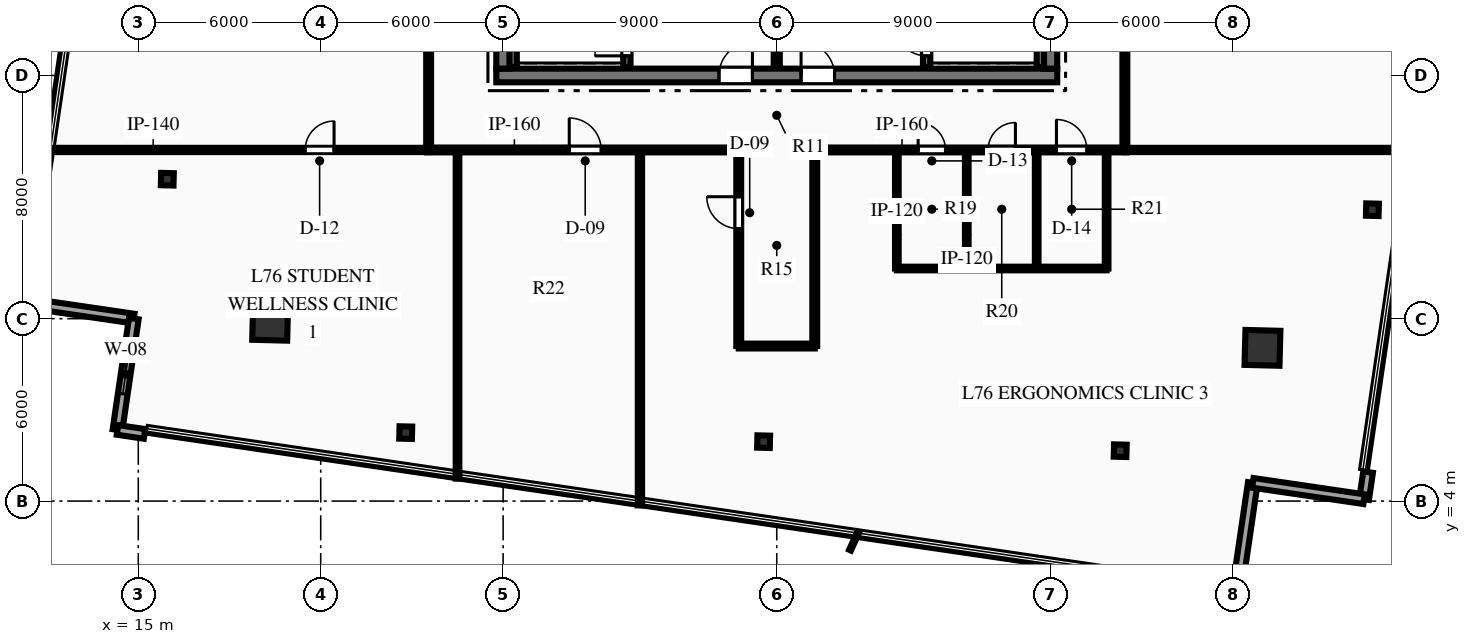
"""IFC4 building model, lengths in metres.
Left out: names, types, materials, properties, quantities, classifications, styles, units other than length and angle.
Written with IfcOpenShell. Run it as: python <this file> out.ifc"""

import sys

from ifc_helpers import new_model, si_unit, direction, frame, frame_2d, origin, origin_2d, place, context, subcontext, project, spatial, rectangle, hollow_rectangle, i_section, extrude, element, fill, save


model = new_model("IFC4")
c1 = context("Model", 3, precision=1e-05, world=origin(), true_north=direction((0.0, 1.0)))
c2 = subcontext(c1, "Body", "Model", "MODEL_VIEW")
j1 = project(units=[si_unit("LENGTHUNIT", "METRE"), si_unit("PLANEANGLEUNIT", "RADIAN")], contexts=[c1])
p1 = place(None, origin())
s1 = spatial("IfcSite", under=j1, at=p1, CompositionType="ELEMENT")
p2 = place(p1, origin())
s2 = spatial("IfcBuilding", under=s1, at=p2, CompositionType="ELEMENT")
p3 = place(p2, frame((0.0, 0.0, 302.7)))
s3 = spatial("IfcBuildingStorey", under=s2, at=p3, CompositionType="ELEMENT", Elevation=302.7)
p4 = place(p3, frame((26.775, 18.0, 0.0), z_axis=(0.0, 0.0, 1.0), x_axis=(1.0, 0.0, 0.0)))
e1 = element("IfcWall", 1, at=p4, inside=s3, PredefinedType="SHEAR", context=c2, shape_type="SweptSolid", body=[
    extrude(rectangle(XDim=18.45, YDim=0.45, at=frame_2d((9.225, 0.0))), origin(), (0.0, 0.0, 1.0), 3.75),
])
p5 = place(p4, frame((7.325, 0.0, 0.0)))
e2 = element("IfcOpeningElement", 2, at=p5, cuts=e1, PredefinedType="OPENING", context=c2, shape_type="SweptSolid", body=[
    extrude(rectangle(XDim=1.1, YDim=2.15, at=frame_2d((0.55, 1.075))), frame((0.0, 0.235, 0.0), z_axis=(0.0, -1.0, 0.0), x_axis=(1.0, 0.0, 0.0)), (0.0, 0.0, 1.0), 0.47),
])
p6 = place(p4, frame((10.025, 0.0, 0.0)))
e3 = element("IfcOpeningElement", 3, at=p6, cuts=e1, PredefinedType="OPENING", context=c2, shape_type="SweptSolid", body=[
    extrude(rectangle(XDim=1.1, YDim=2.15, at=frame_2d((0.55, 1.075))), frame((0.0, 0.235, 0.0), z_axis=(0.0, -1.0, 0.0), x_axis=(1.0, 0.0, 0.0)), (0.0, 0.0, 1.0), 0.47),
])
p7 = place(p3, frame((27.0, 18.225, 0.0), z_axis=(0.0, 0.0, 1.0), x_axis=(0.0, 1.0, 0.0)))
e4 = element("IfcWall", 4, at=p7, inside=s3, PredefinedType="SHEAR", context=c2, shape_type="SweptSolid", body=[
    extrude(rectangle(XDim=15.55, YDim=0.45, at=frame_2d((7.775, 0.0))), origin(), (0.0, 0.0, 1.0), 3.75),
])
p8 = place(p7, frame((10.015, 0.0, 0.0)))
e5 = element("IfcOpeningElement", 5, at=p8, cuts=e4, PredefinedType="OPENING", context=c2, shape_type="SweptSolid", body=[
    extrude(rectangle(XDim=1.4, YDim=2.2, at=frame_2d((0.7, 1.1))), frame((0.0, 0.235, 0.0), z_axis=(0.0, -1.0, 0.0), x_axis=(1.0, 0.0, 0.0)), (0.0, 0.0, 1.0), 0.47),
])
p9 = place(p3, frame((45.0, 18.225, 0.0), z_axis=(0.0, 0.0, 1.0), x_axis=(0.0, 1.0, 0.0)))
e6 = element("IfcWall", 6, at=p9, inside=s3, PredefinedType="SHEAR", context=c2, shape_type="SweptSolid", body=[
    extrude(rectangle(XDim=15.55, YDim=0.45, at=frame_2d((7.775, 0.0))), origin(), (0.0, 0.0, 1.0), 3.75),
])
p10 = place(p9, frame((10.015, 0.0, 0.0)))
e7 = element("IfcOpeningElement", 7, at=p10, cuts=e6, PredefinedType="OPENING", context=c2, shape_type="SweptSolid", body=[
    extrude(rectangle(XDim=1.4, YDim=2.2, at=frame_2d((0.7, 1.1))), frame((0.0, 0.235, 0.0), z_axis=(0.0, -1.0, 0.0), x_axis=(1.0, 0.0, 0.0)), (0.0, 0.0, 1.0), 0.47),
])
p11 = place(p3, frame((31.07, 18.28, 0.0), z_axis=(0.0, 0.0, 1.0), x_axis=(0.0, 1.0, 0.0)))
e8 = element("IfcWall", 8, at=p11, inside=s3, PredefinedType="SHEAR", context=c2, shape_type="SweptSolid", body=[
    extrude(rectangle(XDim=8.26, YDim=0.24, at=frame_2d((4.13, 0.0))), origin(), (0.0, 0.0, 1.0), 3.75),
])
p12 = place(p11, frame((0.365, 0.0, 0.0)))
e9 = element("IfcOpeningElement", 9, at=p12, cuts=e8, PredefinedType="OPENING", context=c2, shape_type="SweptSolid", body=[
    extrude(rectangle(XDim=1.05, YDim=2.15, at=frame_2d((0.525, 1.075))), frame((0.0, 0.13, 0.0), z_axis=(0.0, -1.0, 0.0), x_axis=(1.0, 0.0, 0.0)), (0.0, 0.0, 1.0), 0.26),
])
p13 = place(p3, frame((27.33, 18.28, 0.0), z_axis=(0.0, 0.0, 1.0), x_axis=(0.0, 1.0, 0.0)))
e10 = element("IfcWall", 10, at=p13, inside=s3, PredefinedType="SHEAR", context=c2, shape_type="SweptSolid", body=[
    extrude(rectangle(XDim=8.26, YDim=0.24, at=frame_2d((4.13, 0.0))), origin(), (0.0, 0.0, 1.0), 3.75),
])
p14 = place(p3, frame((40.93, 18.28, 0.0), z_axis=(0.0, 0.0, 1.0), x_axis=(0.0, 1.0, 0.0)))
e11 = element("IfcWall", 11, at=p14, inside=s3, PredefinedType="SHEAR", context=c2, shape_type="SweptSolid", body=[
    extrude(rectangle(XDim=8.26, YDim=0.24, at=frame_2d((4.13, 0.0))), origin(), (0.0, 0.0, 1.0), 3.75),
])
p15 = place(p14, frame((0.365, 0.0, 0.0)))
e12 = element("IfcOpeningElement", 12, at=p15, cuts=e11, PredefinedType="OPENING", context=c2, shape_type="SweptSolid", body=[
    extrude(rectangle(XDim=1.05, YDim=2.15, at=frame_2d((0.525, 1.075))), frame((0.0, 0.13, 0.0), z_axis=(0.0, -1.0, 0.0), x_axis=(1.0, 0.0, 0.0)), (0.0, 0.0, 1.0), 0.26),
])
p16 = place(p3, frame((44.67, 18.28, 0.0), z_axis=(0.0, 0.0, 1.0), x_axis=(0.0, 1.0, 0.0)))
e13 = element("IfcWall", 13, at=p16, inside=s3, PredefinedType="SHEAR", context=c2, shape_type="SweptSolid", body=[
    extrude(rectangle(XDim=8.26, YDim=0.24, at=frame_2d((4.13, 0.0))), origin(), (0.0, 0.0, 1.0), 3.75),
])
for number, where, z_axis, x_axis in (
    (14, (51.976, 9.04, 0.0), (0.0, 0.0, 1.0), (0.025, 1.0, 0.0)),
    (15, (19.336, 9.866, 0.0), (0.0, 0.0, 1.0), (0.025, 1.0, 0.0)),
):
    element("IfcColumn", number, at=place(p3, frame(where, z_axis=z_axis, x_axis=x_axis)), inside=s3, PredefinedType="COLUMN", context=c2, shape_type="SweptSolid", body=[
        extrude(hollow_rectangle(XDim=1.15, YDim=1.15, WallThickness=0.05, at=origin_2d()), origin(), (0.0, 0.0, 1.0), 3.75),
    ])
for number, where, z_axis, x_axis in (
    (16, (55.592, 13.584, 0.0), (0.0, 0.0, 1.0), (0.025, 1.0, 0.0)),
    (17, (15.955, 14.588, 0.0), (0.0, 0.0, 1.0), (0.025, 1.0, 0.0)),
    (18, (23.796, 6.252, 0.0), (0.0, 0.0, 1.0), (0.025, 1.0, 0.0)),
    (19, (35.568, 5.955, 0.0), (0.0, 0.0, 1.0), (0.025, 1.0, 0.0)),
    (20, (47.297, 5.658, 0.0), (0.0, 0.0, 1.0), (0.025, 1.0, 0.0)),
):
    element("IfcColumn", number, at=place(p3, frame(where, z_axis=z_axis, x_axis=x_axis)), inside=s3, PredefinedType="COLUMN", context=c2, shape_type="SweptSolid", body=[
        extrude(i_section(OverallWidth=0.406, OverallDepth=0.416, WebThickness=0.03, FlangeThickness=0.048, at=origin_2d()), origin(), (0.0, 0.0, 1.0), 3.75),
    ])
p17 = place(p3, frame((55.45, 4.952, 0.0), z_axis=(0.0, 0.0, 1.0), x_axis=(-0.145142516059, -0.989410759004, 0.0)))
e21 = element("IfcWall", 21, at=p17, inside=s3, PredefinedType="STANDARD", context=c2, shape_type="SweptSolid", body=[
    extrude(rectangle(XDim=0.9, YDim=0.32, at=frame_2d((0.45, 0.0))), origin(), (0.0, 0.0, 1.0), 3.49),
])
p18 = place(p3, frame((14.853, 10.001, 0.0), z_axis=(0.0, 0.0, 1.0), x_axis=(-0.989398487116, 0.145226146725, 0.0)))
e22 = element("IfcWall", 22, at=p18, inside=s3, PredefinedType="STANDARD", context=c2, shape_type="SweptSolid", body=[
    extrude(rectangle(XDim=3.7, YDim=0.32, at=frame_2d((1.85, 0.0))), origin(), (0.0, 0.0, 1.0), 3.49),
])
p19 = place(p3, frame((14.315, 6.341, 0.0), z_axis=(0.0, 0.0, 1.0), x_axis=(0.145235628047, 0.98939709538, 0.0)))
e23 = element("IfcWall", 23, at=p19, inside=s3, PredefinedType="STANDARD", context=c2, shape_type="SweptSolid", body=[
    extrude(rectangle(XDim=3.7, YDim=0.32, at=frame_2d((1.85, 0.0))), origin(), (0.0, 0.0, 1.0), 3.49),
])
p20 = place(p19, frame((1.2, 0.0, 0.85)))
e24 = element("IfcOpeningElement", 24, at=p20, cuts=e23, PredefinedType="OPENING", context=c2, shape_type="SweptSolid", body=[
    extrude(rectangle(XDim=1.3, YDim=1.9, at=frame_2d((0.65, 0.95))), frame((0.0, 0.17, 0.0), z_axis=(0.0, -1.0, 0.0), x_axis=(1.0, 0.0, 0.0)), (0.0, 0.0, 1.0), 0.34),
])
p21 = place(p3, frame((15.206, 6.21, 0.0), z_axis=(0.0, 0.0, 1.0), x_axis=(-0.989377499091, 0.145369062366, 0.0)))
e25 = element("IfcWall", 25, at=p21, inside=s3, PredefinedType="STANDARD", context=c2, shape_type="SweptSolid", body=[
    extrude(rectangle(XDim=0.9, YDim=0.32, at=frame_2d((0.45, 0.0))), origin(), (0.0, 0.0, 1.0), 3.49),
])
for number, where, z_axis, x_axis in (
    (26, (51.658, 4.599, 0.0), (0.0, 0.0, 1.0), (-0.145, -0.989, 0.0)),
    (27, (55.319, 4.062, 0.0), (0.0, 0.0, 1.0), (-0.989, 0.145, 0.0)),
):
    element("IfcWall", number, at=place(p3, frame(where, z_axis=z_axis, x_axis=x_axis)), inside=s3, PredefinedType="STANDARD", context=c2, shape_type="SweptSolid", body=[
        extrude(rectangle(XDim=3.7, YDim=0.32, at=frame_2d((1.85, 0.0))), origin(), (0.0, 0.0, 1.0), 3.49),
    ])
p22 = place(p3, frame((36.0, 18.28, 0.0), z_axis=(0.0, 0.0, 1.0), x_axis=(0.0, 1.0, 0.0)))
e28 = element("IfcWall", 28, at=p22, inside=s3, PredefinedType="PARTITIONING", context=c2, shape_type="SweptSolid", body=[
    extrude(rectangle(XDim=3.77, YDim=0.2, at=frame_2d((1.885, 0.0))), origin(), (0.0, 0.0, 1.0), 3.49),
])
p23 = place(p3, frame((24.5, 15.55, 0.0), z_axis=(0.0, 0.0, 1.0), x_axis=(1.0, 0.0, 0.0)))
e29 = element("IfcWall", 29, at=p23, inside=s3, PredefinedType="PARTITIONING", context=c2, shape_type="SweptSolid", body=[
    extrude(rectangle(XDim=10.25, YDim=0.16, at=frame_2d((5.125, 0.0))), origin(), (0.0, 0.0, 1.0), 3.49),
])
p24 = place(p23, frame((4.675, 0.0, 0.0)))
e30 = element("IfcOpeningElement", 30, at=p24, cuts=e29, PredefinedType="OPENING", context=c2, shape_type="SweptSolid", body=[
    extrude(rectangle(XDim=1.05, YDim=2.15, at=frame_2d((0.525, 1.075))), frame((0.0, 0.09, 0.0), z_axis=(0.0, -1.0, 0.0), x_axis=(1.0, 0.0, 0.0)), (0.0, 0.0, 1.0), 0.18),
])
p25 = place(p3, frame((37.25, 15.55, 0.0), z_axis=(0.0, 0.0, 1.0), x_axis=(1.0, 0.0, 0.0)))
e31 = element("IfcWall", 31, at=p25, inside=s3, PredefinedType="PARTITIONING", context=c2, shape_type="SweptSolid", body=[
    extrude(rectangle(XDim=10.25, YDim=0.16, at=frame_2d((5.125, 0.0))), origin(), (0.0, 0.0, 1.0), 3.49),
])
p26 = place(p25, frame((3.4, 0.0, 0.0)))
e32 = element("IfcOpeningElement", 32, at=p26, cuts=e31, PredefinedType="OPENING", context=c2, shape_type="SweptSolid", body=[
    extrude(rectangle(XDim=0.9, YDim=2.15, at=frame_2d((0.45, 1.075))), frame((0.0, 0.09, 0.0), z_axis=(0.0, -1.0, 0.0), x_axis=(1.0, 0.0, 0.0)), (0.0, 0.0, 1.0), 0.18),
])
p27 = place(p25, frame((5.7, 0.0, 0.0)))
e33 = element("IfcOpeningElement", 33, at=p27, cuts=e31, PredefinedType="OPENING", context=c2, shape_type="SweptSolid", body=[
    extrude(rectangle(XDim=0.9, YDim=2.15, at=frame_2d((0.45, 1.075))), frame((0.0, 0.09, 0.0), z_axis=(0.0, -1.0, 0.0), x_axis=(1.0, 0.0, 0.0)), (0.0, 0.0, 1.0), 0.18),
])
p28 = place(p25, frame((7.95, 0.0, 0.0)))
e34 = element("IfcOpeningElement", 34, at=p28, cuts=e31, PredefinedType="OPENING", context=c2, shape_type="SweptSolid", body=[
    extrude(rectangle(XDim=1.0, YDim=2.15, at=frame_2d((0.5, 1.075))), frame((0.0, 0.09, 0.0), z_axis=(0.0, -1.0, 0.0), x_axis=(1.0, 0.0, 0.0)), (0.0, 0.0, 1.0), 0.18),
])
p29 = place(p3, frame((24.55, 15.55, 0.0), z_axis=(0.0, 0.0, 1.0), x_axis=(0.0, 1.0, 0.0)))
e35 = element("IfcWall", 35, at=p29, inside=s3, PredefinedType="PARTITIONING", context=c2, shape_type="SweptSolid", body=[
    extrude(rectangle(XDim=9.2, YDim=0.16, at=frame_2d((4.6, 0.0))), origin(), (0.0, 0.0, 1.0), 3.49),
])
p30 = place(p29, frame((4.075, 0.0, 0.0)))
e36 = element("IfcOpeningElement", 36, at=p30, cuts=e35, PredefinedType="OPENING", context=c2, shape_type="SweptSolid", body=[
    extrude(rectangle(XDim=1.05, YDim=2.15, at=frame_2d((0.525, 1.075))), frame((0.0, 0.09, 0.0), z_axis=(0.0, -1.0, 0.0), x_axis=(1.0, 0.0, 0.0)), (0.0, 0.0, 1.0), 0.18),
])
p31 = place(p3, frame((47.45, 15.55, 0.0), z_axis=(0.0, 0.0, 1.0), x_axis=(0.0, 1.0, 0.0)))
e37 = element("IfcWall", 37, at=p31, inside=s3, PredefinedType="PARTITIONING", context=c2, shape_type="SweptSolid", body=[
    extrude(rectangle(XDim=9.2, YDim=0.16, at=frame_2d((4.6, 0.0))), origin(), (0.0, 0.0, 1.0), 3.49),
])
p32 = place(p3, frame((34.75, 9.1, 0.0), z_axis=(0.0, 0.0, 1.0), x_axis=(0.0, 1.0, 0.0)))
e38 = element("IfcWall", 38, at=p32, inside=s3, PredefinedType="PARTITIONING", context=c2, shape_type="SweptSolid", body=[
    extrude(rectangle(XDim=6.45, YDim=0.16, at=frame_2d((3.225, 0.0))), origin(), (0.0, 0.0, 1.0), 3.49),
])
p33 = place(p32, frame((3.861, 0.0, 0.0)))
e39 = element("IfcOpeningElement", 39, at=p33, cuts=e38, PredefinedType="OPENING", context=c2, shape_type="SweptSolid", body=[
    extrude(rectangle(XDim=1.05, YDim=2.15, at=frame_2d((0.525, 1.075))), frame((0.0, 0.09, 0.0), z_axis=(0.0, -1.0, 0.0), x_axis=(1.0, 0.0, 0.0)), (0.0, 0.0, 1.0), 0.18),
])
p34 = place(p3, frame((37.25, 9.1, 0.0), z_axis=(0.0, 0.0, 1.0), x_axis=(0.0, 1.0, 0.0)))
e40 = element("IfcWall", 40, at=p34, inside=s3, PredefinedType="PARTITIONING", context=c2, shape_type="SweptSolid", body=[
    extrude(rectangle(XDim=6.45, YDim=0.16, at=frame_2d((3.225, 0.0))), origin(), (0.0, 0.0, 1.0), 3.49),
])
p35 = place(p3, frame((34.75, 9.1, 0.0), z_axis=(0.0, 0.0, 1.0), x_axis=(1.0, 0.0, 0.0)))
e41 = element("IfcWall", 41, at=p35, inside=s3, PredefinedType="PARTITIONING", context=c2, shape_type="SweptSolid", body=[
    extrude(rectangle(XDim=2.5, YDim=0.16, at=frame_2d((1.25, 0.0))), origin(), (0.0, 0.0, 1.0), 3.49),
])
for number, where, z_axis, x_axis in (
    (42, (39.95, 11.65, 0.0), (0.0, 0.0, 1.0), (0.0, 1.0, 0.0)),
    (43, (42.25, 11.65, 0.0), (0.0, 0.0, 1.0), (0.0, 1.0, 0.0)),
    (44, (44.55, 11.65, 0.0), (0.0, 0.0, 1.0), (0.0, 1.0, 0.0)),
    (45, (46.85, 11.65, 0.0), (0.0, 0.0, 1.0), (0.0, 1.0, 0.0)),
):
    element("IfcWall", number, at=place(p3, frame(where, z_axis=z_axis, x_axis=x_axis)), inside=s3, PredefinedType="PARTITIONING", context=c2, shape_type="SweptSolid", body=[
        extrude(rectangle(XDim=3.9, YDim=0.12, at=frame_2d((1.95, 0.0))), origin(), (0.0, 0.0, 1.0), 3.49),
    ])
p36 = place(p3, frame((39.95, 11.65, 0.0), z_axis=(0.0, 0.0, 1.0), x_axis=(1.0, 0.0, 0.0)))
e46 = element("IfcWall", 46, at=p36, inside=s3, PredefinedType="PARTITIONING", context=c2, shape_type="SweptSolid", body=[
    extrude(rectangle(XDim=6.9, YDim=0.12, at=frame_2d((3.45, 0.0))), origin(), (0.0, 0.0, 1.0), 3.49),
])
p37 = place(p3, frame((11.968, 15.55, 0.0), z_axis=(0.0, 0.0, 1.0), x_axis=(1.0, 0.0, 0.0)))
e47 = element("IfcWall", 47, at=p37, inside=s3, PredefinedType="PARTITIONING", context=c2, shape_type="SweptSolid", body=[
    extrude(rectangle(XDim=12.582, YDim=0.14, at=frame_2d((6.291, 0.0))), origin(), (0.0, 0.0, 1.0), 3.079),
])
p38 = place(p37, frame((8.521, 0.0, 0.0)))
e48 = element("IfcOpeningElement", 48, at=p38, cuts=e47, PredefinedType="OPENING", context=c2, shape_type="SweptSolid", body=[
    extrude(rectangle(XDim=0.95, YDim=2.15, at=frame_2d((0.475, 1.075))), frame((0.0, 0.08, 0.0), z_axis=(0.0, -1.0, 0.0), x_axis=(1.0, 0.0, 0.0)), (0.0, 0.0, 1.0), 0.16),
])
p39 = place(p3, frame((47.45, 15.55, 0.0), z_axis=(0.0, 0.0, 1.0), x_axis=(1.0, 0.0, 0.0)))
e49 = element("IfcWall", 49, at=p39, inside=s3, PredefinedType="PARTITIONING", context=c2, shape_type="SweptSolid", body=[
    extrude(rectangle(XDim=9.515, YDim=0.14, at=frame_2d((4.757, 0.0))), origin(), (0.0, 0.0, 1.0), 2.868),
])
p40 = place(p3, frame((25.5, 4.74, 0.0), z_axis=(0.0, 0.0, 1.0), x_axis=(0.0, 1.0, 0.0)))
e50 = element("IfcWall", 50, at=p40, inside=s3, PredefinedType="PARTITIONING", context=c2, shape_type="SweptSolid", body=[
    extrude(rectangle(XDim=10.811, YDim=0.12, at=frame_2d((5.405, 0.0))), origin(), (0.0, 0.0, 1.0), 2.868),
])
p41 = place(p3, frame((31.5, 3.859, 0.0), z_axis=(0.0, 0.0, 1.0), x_axis=(0.0, 1.0, 0.0)))
e51 = element("IfcWall", 51, at=p41, inside=s3, PredefinedType="PARTITIONING", context=c2, shape_type="SweptSolid", body=[
    extrude(rectangle(XDim=11.691, YDim=0.14, at=frame_2d((5.846, 0.0))), origin(), (0.0, 0.0, 1.0), 3.49),
])
p42 = place(p20, origin())
e52 = element("IfcWindow", 52, at=p42, inside=s3, PartitioningType="SINGLE_PANEL", PredefinedType="WINDOW", context=c2, shape_type="SweptSolid", body=[
    extrude(rectangle(XDim=1.3, YDim=1.9, at=frame_2d((0.65, 0.95))), frame((0.0, 0.03, 0.0), z_axis=(0.0, -1.0, 0.0), x_axis=(1.0, 0.0, 0.0)), (0.0, 0.0, 1.0), 0.06),
])
fill(e24, e52)
p43 = place(p12, origin())
e53 = element("IfcDoor", 53, at=p43, inside=s3, OperationType="SINGLE_SWING_LEFT", PredefinedType="DOOR", context=c2, shape_type="SweptSolid", body=[
    extrude(rectangle(XDim=1.05, YDim=2.15, at=frame_2d((0.525, 1.075))), frame((0.0, 0.025, 0.0), z_axis=(0.0, -1.0, 0.0), x_axis=(1.0, 0.0, 0.0)), (0.0, 0.0, 1.0), 0.05),
])
fill(e9, e53)
p44 = place(p15, origin())
e54 = element("IfcDoor", 54, at=p44, inside=s3, OperationType="SINGLE_SWING_RIGHT", PredefinedType="DOOR", context=c2, shape_type="SweptSolid", body=[
    extrude(rectangle(XDim=1.05, YDim=2.15, at=frame_2d((0.525, 1.075))), frame((0.0, 0.025, 0.0), z_axis=(0.0, -1.0, 0.0), x_axis=(1.0, 0.0, 0.0)), (0.0, 0.0, 1.0), 0.05),
])
fill(e12, e54)
p45 = place(p5, origin())
e55 = element("IfcDoor", 55, at=p45, inside=s3, OperationType="SINGLE_SWING_RIGHT", PredefinedType="DOOR", context=c2, shape_type="SweptSolid", body=[
    extrude(rectangle(XDim=1.1, YDim=2.15, at=frame_2d((0.55, 1.075))), frame((0.0, 0.025, 0.0), z_axis=(0.0, -1.0, 0.0), x_axis=(1.0, 0.0, 0.0)), (0.0, 0.0, 1.0), 0.05),
])
fill(e2, e55)
p46 = place(p6, origin())
e56 = element("IfcDoor", 56, at=p46, inside=s3, OperationType="SINGLE_SWING_LEFT", PredefinedType="DOOR", context=c2, shape_type="SweptSolid", body=[
    extrude(rectangle(XDim=1.1, YDim=2.15, at=frame_2d((0.55, 1.075))), frame((0.0, 0.025, 0.0), z_axis=(0.0, -1.0, 0.0), x_axis=(1.0, 0.0, 0.0)), (0.0, 0.0, 1.0), 0.05),
])
fill(e3, e56)
p47 = place(p26, origin())
e57 = element("IfcDoor", 57, at=p47, inside=s3, OperationType="SINGLE_SWING_LEFT", PredefinedType="DOOR", context=c2, shape_type="SweptSolid", body=[
    extrude(rectangle(XDim=0.9, YDim=2.15, at=frame_2d((0.45, 1.075))), frame((0.0, 0.025, 0.0), z_axis=(0.0, -1.0, 0.0), x_axis=(1.0, 0.0, 0.0)), (0.0, 0.0, 1.0), 0.05),
])
fill(e32, e57)
p48 = place(p27, origin())
e58 = element("IfcDoor", 58, at=p48, inside=s3, OperationType="SINGLE_SWING_RIGHT", PredefinedType="DOOR", context=c2, shape_type="SweptSolid", body=[
    extrude(rectangle(XDim=0.9, YDim=2.15, at=frame_2d((0.45, 1.075))), frame((0.0, 0.025, 0.0), z_axis=(0.0, -1.0, 0.0), x_axis=(1.0, 0.0, 0.0)), (0.0, 0.0, 1.0), 0.05),
])
fill(e33, e58)
p49 = place(p28, origin())
e59 = element("IfcDoor", 59, at=p49, inside=s3, OperationType="SINGLE_SWING_LEFT", PredefinedType="DOOR", context=c2, shape_type="SweptSolid", body=[
    extrude(rectangle(XDim=1.0, YDim=2.15, at=frame_2d((0.5, 1.075))), frame((0.0, 0.025, 0.0), z_axis=(0.0, -1.0, 0.0), x_axis=(1.0, 0.0, 0.0)), (0.0, 0.0, 1.0), 0.05),
])
fill(e34, e59)
p50 = place(p38, origin())
e60 = element("IfcDoor", 60, at=p50, inside=s3, OperationType="SINGLE_SWING_RIGHT", PredefinedType="DOOR", context=c2, shape_type="SweptSolid", body=[
    extrude(rectangle(XDim=0.95, YDim=2.15, at=frame_2d((0.475, 1.075))), frame((0.0, 0.025, 0.0), z_axis=(0.0, -1.0, 0.0), x_axis=(1.0, 0.0, 0.0)), (0.0, 0.0, 1.0), 0.05),
])
fill(e48, e60)
p51 = place(p24, origin())
e61 = element("IfcDoor", 61, at=p51, inside=s3, OperationType="SINGLE_SWING_LEFT", PredefinedType="DOOR", context=c2, shape_type="SweptSolid", body=[
    extrude(rectangle(XDim=1.05, YDim=2.15, at=frame_2d((0.525, 1.075))), frame((0.0, 0.025, 0.0), z_axis=(0.0, -1.0, 0.0), x_axis=(1.0, 0.0, 0.0)), (0.0, 0.0, 1.0), 0.05),
])
fill(e30, e61)
p52 = place(p33, origin())
e62 = element("IfcDoor", 62, at=p52, inside=s3, OperationType="SINGLE_SWING_RIGHT", PredefinedType="DOOR", context=c2, shape_type="SweptSolid", body=[
    extrude(rectangle(XDim=1.05, YDim=2.15, at=frame_2d((0.525, 1.075))), frame((0.0, 0.025, 0.0), z_axis=(0.0, -1.0, 0.0), x_axis=(1.0, 0.0, 0.0)), (0.0, 0.0, 1.0), 0.05),
])
fill(e39, e62)
save(model, sys.argv[1])
